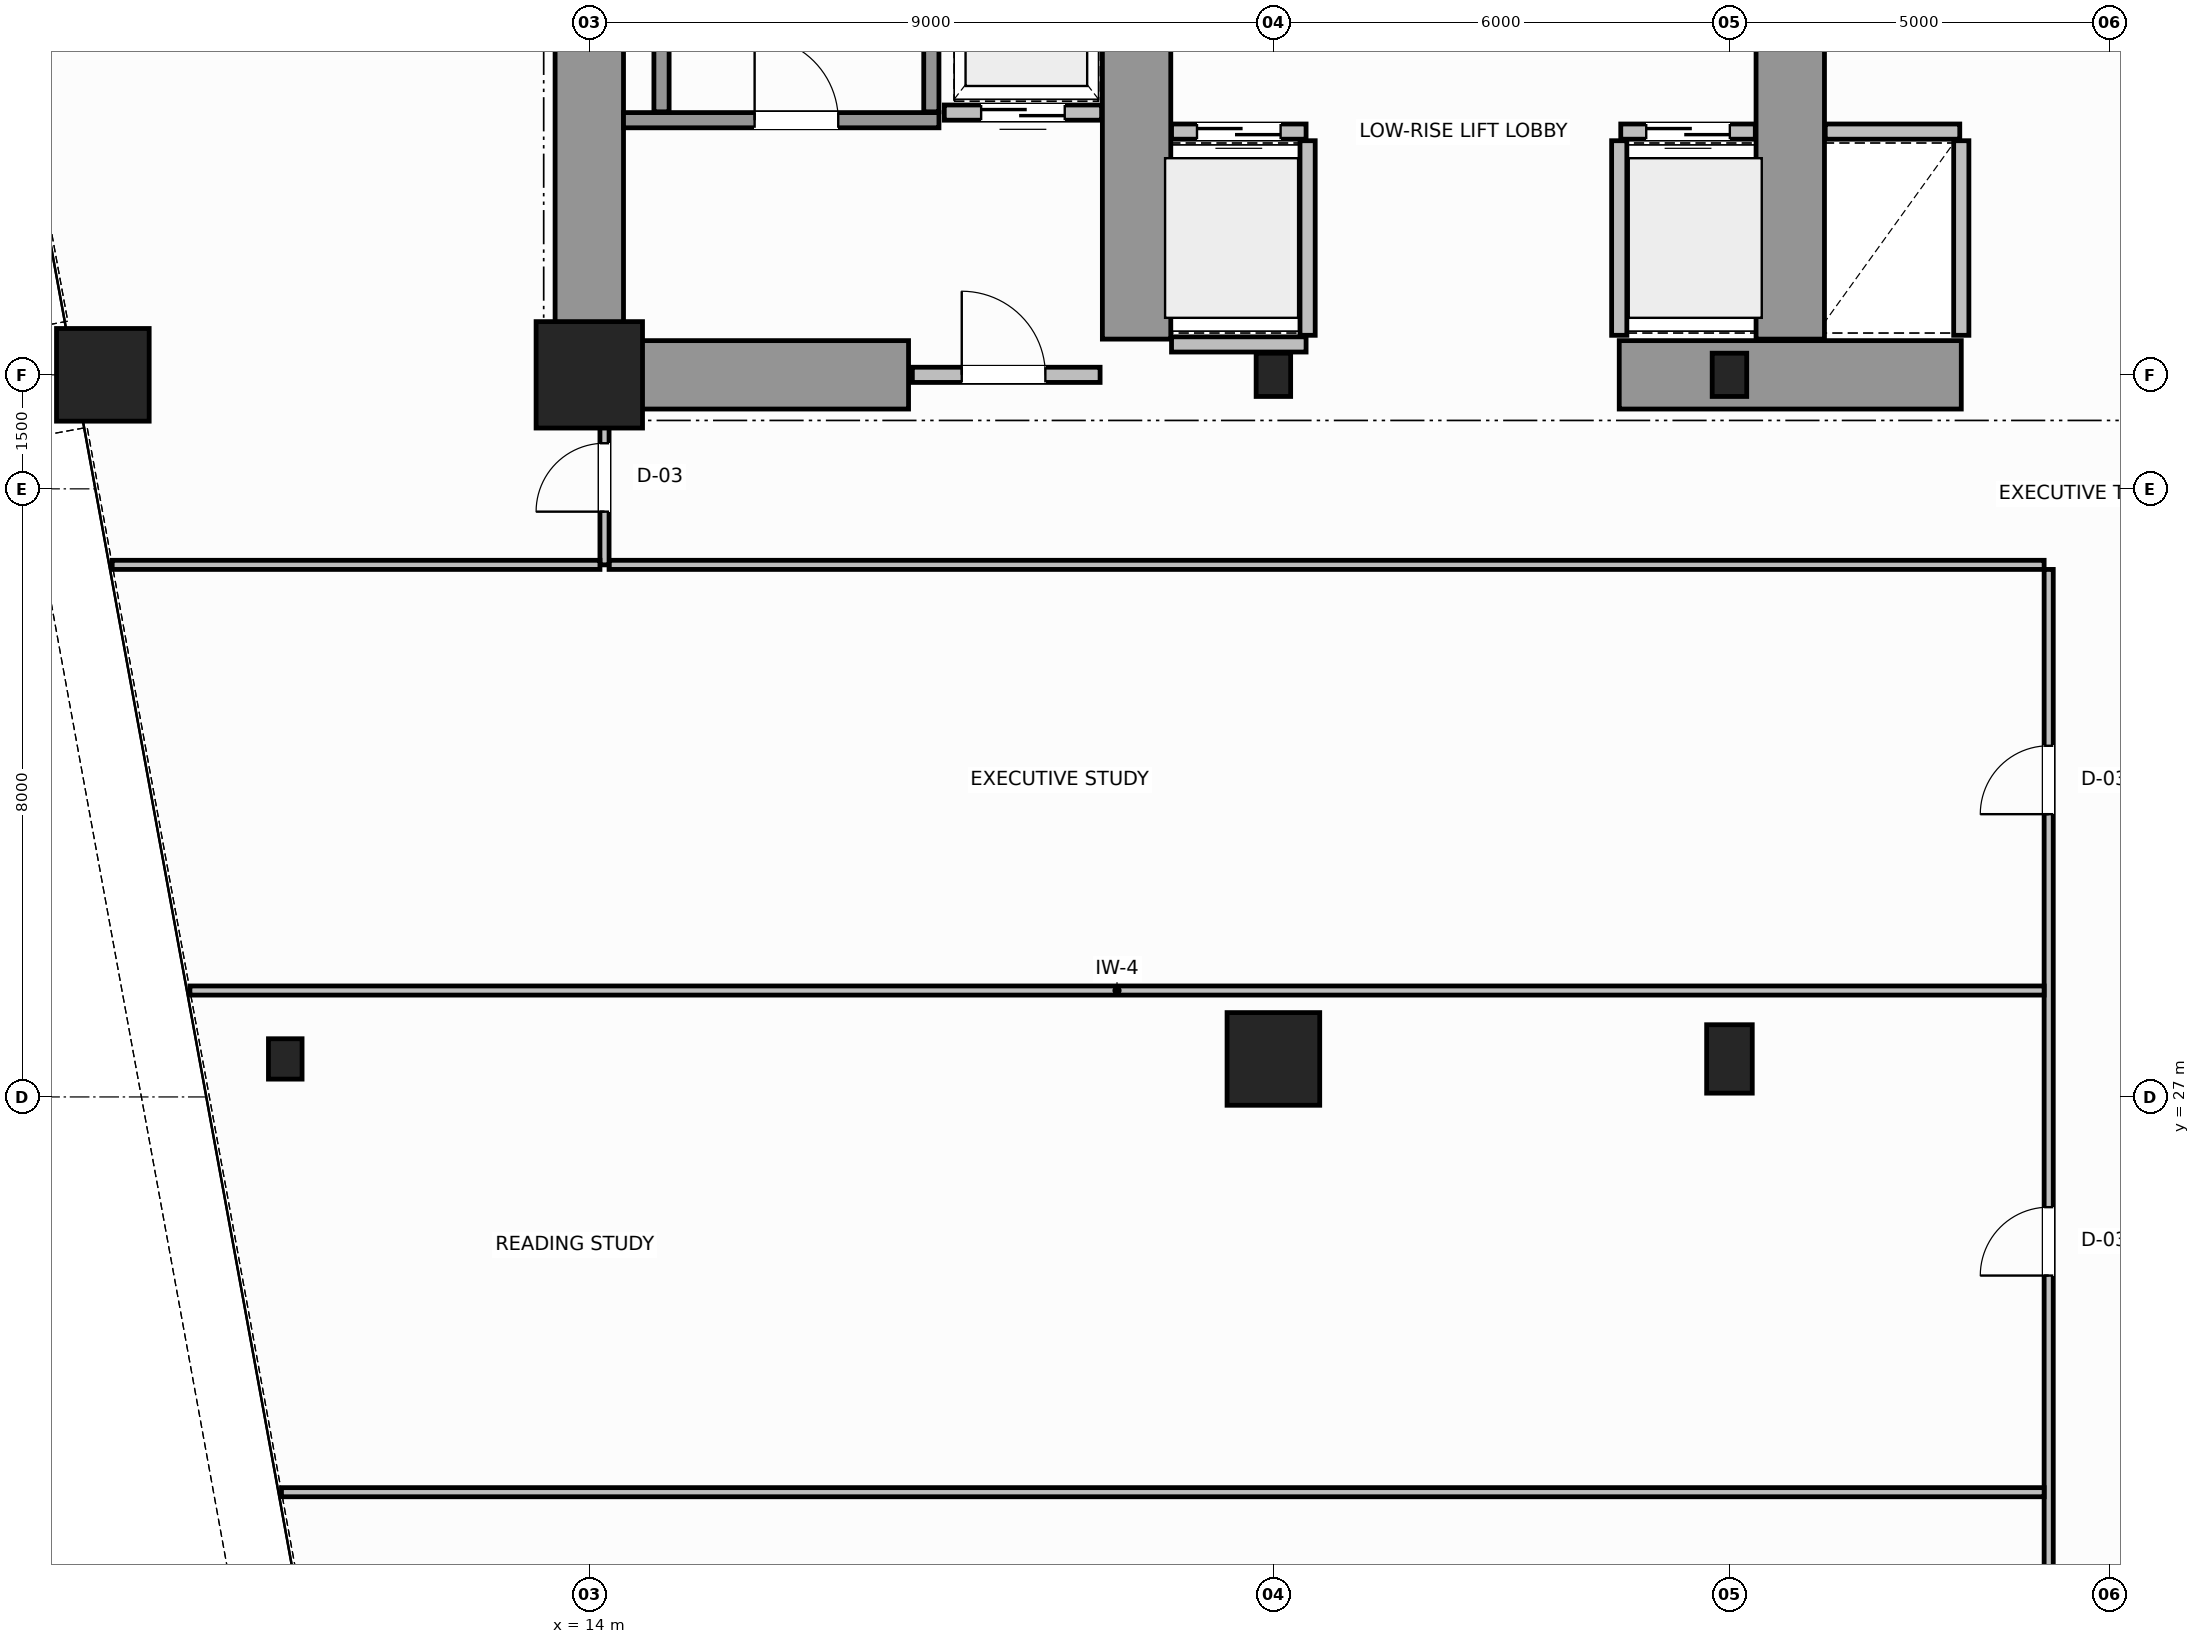
"""IFC4 building model, lengths in metres.
Left out: names, types, materials, properties, quantities, classifications, styles, units other than length and angle.
Written with IfcOpenShell. Run it as: python <this file> out.ifc"""

import sys

from ifc_helpers import new_model, si_unit, direction, frame, frame_2d, origin, origin_2d, place, context, subcontext, project, spatial, rectangle, hollow_rectangle, hollow_circle, i_section, extrude, source, transform, mapped, element, fill, save


model = new_model("IFC4")
c1 = context("Model", 3, precision=1e-05, world=origin(), true_north=direction((0.0, 1.0)))
c2 = subcontext(c1, "Body", "Model", "MODEL_VIEW")
j1 = project(units=[si_unit("LENGTHUNIT", "METRE"), si_unit("PLANEANGLEUNIT", "RADIAN")], contexts=[c1])
p1 = place(None, origin())
s1 = spatial("IfcSite", under=j1, at=p1, CompositionType="ELEMENT")
p2 = place(p1, origin())
s2 = spatial("IfcBuilding", under=s1, at=p2, CompositionType="ELEMENT")
p3 = place(p2, frame((0.0, 0.0, 68.2)))
s3 = spatial("IfcBuildingStorey", under=s2, at=p3, CompositionType="ELEMENT", Elevation=68.2)
m1 = source(origin(), c2, "Body", "SweptSolid", [
    extrude(rectangle(XDim=1.4, YDim=1.4, at=origin_2d()), origin(), (0.0, 0.0, 1.0), 3.8),
])
p4 = place(p3, frame((14.0, 36.5, 0.0), z_axis=(0.0, 0.0, 1.0), x_axis=(1.0, 0.0, 0.0)))
e1 = element("IfcColumn", 1, at=p4, inside=s3, PredefinedType="COLUMN", context=c2, shape_type="MappedRepresentation", body=[
    mapped(m1, transform((0.0, 0.0, 0.0), scale=1.0)),
])
m2 = source(origin(), c2, "Body", "SweptSolid", [
    extrude(i_section(OverallWidth=0.454, OverallDepth=0.569, WebThickness=0.078, FlangeThickness=0.08, FilletRadius=0.015, at=origin_2d()), origin(), (0.0, 0.0, 1.0), 3.8),
])
for number, where, z_axis, x_axis in (
    (2, (23.0, 36.5, 0.0), (0.0, 0.0, 1.0), (1.0, 0.0, 0.0)),
    (3, (29.0, 36.5, 0.0), (0.0, 0.0, 1.0), (1.0, 0.0, 0.0)),
):
    element("IfcColumn", number, at=place(p3, frame(where, z_axis=z_axis, x_axis=x_axis)), inside=s3, PredefinedType="COLUMN", context=c2, shape_type="MappedRepresentation", body=[
        mapped(m2, transform((0.0, 0.0, 0.0), scale=1.0)),
    ])
m3 = source(origin(), c2, "Body", "SweptSolid", [
    extrude(hollow_circle(Radius=0.61, WallThickness=0.05, at=origin_2d()), origin(), (0.0, 0.0, 1.0), 3.8),
])
p5 = place(p3, frame((7.6, 36.5, 0.0), z_axis=(0.0, 0.0, 1.0), x_axis=(1.0, 0.0, 0.0)))
e4 = element("IfcColumn", 4, at=p5, inside=s3, PredefinedType="COLUMN", context=c2, shape_type="MappedRepresentation", body=[
    mapped(m3, transform((0.0, 0.0, 0.0), scale=1.0)),
])
m4 = source(origin(), c2, "Body", "SweptSolid", [
    extrude(i_section(OverallWidth=0.442, OverallDepth=0.531, WebThickness=0.065, FlangeThickness=0.076, FilletRadius=0.015, at=origin_2d()), origin(), (0.0, 0.0, 1.0), 3.8),
])
p6 = place(p3, frame((10.0, 27.5, 0.0), z_axis=(0.0, 0.0, 1.0), x_axis=(1.0, 0.0, 0.0)))
e5 = element("IfcColumn", 5, at=p6, inside=s3, PredefinedType="COLUMN", context=c2, shape_type="MappedRepresentation", body=[
    mapped(m4, transform((0.0, 0.0, 0.0), scale=1.0)),
])
p7 = place(p3, frame((23.0, 27.5, 0.0), z_axis=(0.0, 0.0, 1.0), x_axis=(1.0, 0.0, 0.0)))
e6 = element("IfcColumn", 6, at=p7, inside=s3, PredefinedType="COLUMN", context=c2, shape_type="MappedRepresentation", body=[
    mapped(m3, transform((0.0, 0.0, 0.0), scale=1.0)),
])
m5 = source(origin(), c2, "Body", "SweptSolid", [
    extrude(hollow_rectangle(XDim=0.6, YDim=0.9, WallThickness=0.04, InnerFilletRadius=0.04, OuterFilletRadius=0.08, at=origin_2d()), origin(), (0.0, 0.0, 1.0), 3.8),
])
p8 = place(p3, frame((29.0, 27.5, 0.0), z_axis=(0.0, 0.0, 1.0), x_axis=(1.0, 0.0, 0.0)))
e7 = element("IfcColumn", 7, at=p8, inside=s3, PredefinedType="COLUMN", context=c2, shape_type="MappedRepresentation", body=[
    mapped(m5, transform((0.0, 0.0, 0.0), scale=1.0)),
])
p9 = place(p3, frame((14.0, 36.5, 0.0), z_axis=(0.0, 0.0, 1.0), x_axis=(0.0, 1.0, 0.0)))
e8 = element("IfcWall", 8, at=p9, inside=s3, PredefinedType="SHEAR", context=c2, shape_type="SweptSolid", body=[
    extrude(rectangle(XDim=14.5, YDim=0.9, at=frame_2d((7.25, 0.0))), origin(), (0.0, 0.0, 1.0), 3.8),
])
p10 = place(p3, frame((14.47, 36.5, 0.0), z_axis=(0.0, 0.0, 1.0), x_axis=(1.0, 0.0, 0.0)))
e9 = element("IfcWall", 9, at=p10, inside=s3, PredefinedType="SHEAR", context=c2, shape_type="SweptSolid", body=[
    extrude(rectangle(XDim=3.73, YDim=0.9, at=frame_2d((1.865, 0.0))), origin(), (0.0, 0.0, 1.0), 2.38),
])
p11 = place(p3, frame((27.55, 36.5, 0.0), z_axis=(0.0, 0.0, 1.0), x_axis=(1.0, 0.0, 0.0)))
e10 = element("IfcWall", 10, at=p11, inside=s3, PredefinedType="SHEAR", context=c2, shape_type="SweptSolid", body=[
    extrude(rectangle(XDim=4.5, YDim=0.9, at=frame_2d((2.25, 0.0))), origin(), (0.0, 0.0, 1.0), 3.8),
])
for number, where, z_axis, x_axis in (
    (11, (21.2, 36.97, 0.0), (0.0, 0.0, 1.0), (0.0, 1.0, 0.0)),
    (12, (29.8, 36.97, 0.0), (0.0, 0.0, 1.0), (0.0, 1.0, 0.0)),
):
    element("IfcWall", number, at=place(p3, frame(where, z_axis=z_axis, x_axis=x_axis)), inside=s3, PredefinedType="SHEAR", context=c2, shape_type="SweptSolid", body=[
        extrude(rectangle(XDim=9.23, YDim=0.9, at=frame_2d((4.615, 0.0))), origin(), (0.0, 0.0, 1.0), 3.8),
    ])
p12 = place(p3, frame((14.45, 39.85, 0.0), z_axis=(0.0, 0.0, 1.0), x_axis=(1.0, 0.0, 0.0)))
e13 = element("IfcWall", 13, at=p12, inside=s3, PredefinedType="SOLIDWALL", context=c2, shape_type="SweptSolid", body=[
    extrude(rectangle(XDim=4.15, YDim=0.2, at=frame_2d((2.075, 0.0))), origin(), (0.0, 0.0, 1.0), 3.8),
])
p13 = place(p12, frame((1.725, 0.0, 0.0)))
e14 = element("IfcOpeningElement", 14, at=p13, cuts=e13, PredefinedType="OPENING", context=c2, shape_type="SweptSolid", body=[
    extrude(rectangle(XDim=1.1, YDim=2.15, at=frame_2d((0.55, 1.075))), frame((0.0, 0.11, 0.0), z_axis=(0.0, -1.0, 0.0), x_axis=(1.0, 0.0, 0.0)), (0.0, 0.0, 1.0), 0.22),
])
for number, where, z_axis, x_axis in (
    (15, (14.95, 39.96, 0.0), (0.0, 0.0, 1.0), (0.0, 1.0, 0.0)),
    (16, (18.5, 39.96, 0.0), (0.0, 0.0, 1.0), (0.0, 1.0, 0.0)),
):
    element("IfcWall", number, at=place(p3, frame(where, z_axis=z_axis, x_axis=x_axis)), inside=s3, PredefinedType="SOLIDWALL", context=c2, shape_type="SweptSolid", body=[
        extrude(rectangle(XDim=9.93, YDim=0.2, at=frame_2d((4.965, 0.0))), origin(), (0.0, 0.0, 1.0), 3.8),
    ])
p14 = place(p3, frame((18.25, 36.5, 0.0), z_axis=(0.0, 0.0, 1.0), x_axis=(1.0, 0.0, 0.0)))
e17 = element("IfcWall", 17, at=p14, inside=s3, PredefinedType="SOLIDWALL", context=c2, shape_type="SweptSolid", body=[
    extrude(rectangle(XDim=2.47, YDim=0.2, at=frame_2d((1.235, 0.0))), origin(), (0.0, 0.0, 1.0), 2.37),
])
p15 = place(p14, frame((0.65, 0.0, 0.0)))
e18 = element("IfcOpeningElement", 18, at=p15, cuts=e17, PredefinedType="OPENING", context=c2, shape_type="SweptSolid", body=[
    extrude(rectangle(XDim=1.1, YDim=2.15, at=frame_2d((0.55, 1.075))), frame((0.0, 0.11, 0.0), z_axis=(0.0, -1.0, 0.0), x_axis=(1.0, 0.0, 0.0)), (0.0, 0.0, 1.0), 0.22),
])
p16 = place(p3, frame((21.66, 39.7, 0.0), z_axis=(0.0, 0.0, 1.0), x_axis=(1.0, 0.0, 0.0)))
e19 = element("IfcWall", 19, at=p16, inside=s3, PredefinedType="SOLIDWALL", context=c2, shape_type="SweptSolid", body=[
    extrude(rectangle(XDim=1.77, YDim=0.2, at=frame_2d((0.885, 0.0))), origin(), (0.0, 0.0, 1.0), 3.58),
])
p17 = place(p16, frame((0.335, 0.0, 0.0)))
e20 = element("IfcOpeningElement", 20, at=p17, cuts=e19, PredefinedType="OPENING", context=c2, shape_type="SweptSolid", body=[
    extrude(rectangle(XDim=1.1, YDim=2.15, at=frame_2d((0.55, 1.075))), frame((0.0, 0.11, 0.0), z_axis=(0.0, -1.0, 0.0), x_axis=(1.0, 0.0, 0.0)), (0.0, 0.0, 1.0), 0.22),
])
p18 = place(p3, frame((21.66, 36.9, 0.0), z_axis=(0.0, 0.0, 1.0), x_axis=(1.0, 0.0, 0.0)))
e21 = element("IfcWall", 21, at=p18, inside=s3, PredefinedType="SOLIDWALL", context=c2, shape_type="SweptSolid", body=[
    extrude(rectangle(XDim=1.77, YDim=0.2, at=frame_2d((0.885, 0.0))), origin(), (0.0, 0.0, 1.0), 2.37),
])
p19 = place(p3, frame((23.45, 37.02, 0.0), z_axis=(0.0, 0.0, 1.0), x_axis=(0.0, 1.0, 0.0)))
e22 = element("IfcWall", 22, at=p19, inside=s3, PredefinedType="SOLIDWALL", context=c2, shape_type="SweptSolid", body=[
    extrude(rectangle(XDim=2.56, YDim=0.2, at=frame_2d((1.28, 0.0))), origin(), (0.0, 0.0, 1.0), 3.58),
])
p20 = place(p3, frame((27.57, 39.7, 0.0), z_axis=(0.0, 0.0, 1.0), x_axis=(1.0, 0.0, 0.0)))
e23 = element("IfcWall", 23, at=p20, inside=s3, PredefinedType="SOLIDWALL", context=c2, shape_type="SweptSolid", body=[
    extrude(rectangle(XDim=1.77, YDim=0.2, at=frame_2d((0.885, 0.0))), origin(), (0.0, 0.0, 1.0), 3.58),
])
p21 = place(p20, frame((0.335, 0.0, 0.0)))
e24 = element("IfcOpeningElement", 24, at=p21, cuts=e23, PredefinedType="OPENING", context=c2, shape_type="SweptSolid", body=[
    extrude(rectangle(XDim=1.1, YDim=2.15, at=frame_2d((0.55, 1.075))), frame((0.0, 0.11, 0.0), z_axis=(0.0, -1.0, 0.0), x_axis=(1.0, 0.0, 0.0)), (0.0, 0.0, 1.0), 0.22),
])
p22 = place(p3, frame((27.55, 37.02, 0.0), z_axis=(0.0, 0.0, 1.0), x_axis=(0.0, 1.0, 0.0)))
e25 = element("IfcWall", 25, at=p22, inside=s3, PredefinedType="SOLIDWALL", context=c2, shape_type="SweptSolid", body=[
    extrude(rectangle(XDim=2.56, YDim=0.2, at=frame_2d((1.28, 0.0))), origin(), (0.0, 0.0, 1.0), 3.58),
])
p23 = place(p3, frame((30.26, 39.7, 0.0), z_axis=(0.0, 0.0, 1.0), x_axis=(1.0, 0.0, 0.0)))
e26 = element("IfcWall", 26, at=p23, inside=s3, PredefinedType="SOLIDWALL", context=c2, shape_type="SweptSolid", body=[
    extrude(rectangle(XDim=1.77, YDim=0.2, at=frame_2d((0.885, 0.0))), origin(), (0.0, 0.0, 1.0), 3.58),
])
p24 = place(p3, frame((32.05, 37.02, 0.0), z_axis=(0.0, 0.0, 1.0), x_axis=(0.0, 1.0, 0.0)))
e27 = element("IfcWall", 27, at=p24, inside=s3, PredefinedType="SOLIDWALL", context=c2, shape_type="SweptSolid", body=[
    extrude(rectangle(XDim=2.56, YDim=0.2, at=frame_2d((1.28, 0.0))), origin(), (0.0, 0.0, 1.0), 3.58),
])
p25 = place(p3, frame((18.67, 39.95, 0.0), z_axis=(0.0, 0.0, 1.0), x_axis=(1.0, 0.0, 0.0)))
e28 = element("IfcWall", 28, at=p25, inside=s3, PredefinedType="SOLIDWALL", context=c2, shape_type="SweptSolid", body=[
    extrude(rectangle(XDim=2.07, YDim=0.2, at=frame_2d((1.035, 0.0))), origin(), (0.0, 0.0, 1.0), 3.58),
])
p26 = place(p25, frame((0.485, 0.0, 0.0)))
e29 = element("IfcOpeningElement", 29, at=p26, cuts=e28, PredefinedType="OPENING", context=c2, shape_type="SweptSolid", body=[
    extrude(rectangle(XDim=1.1, YDim=2.15, at=frame_2d((0.55, 1.075))), frame((0.0, 0.11, 0.0), z_axis=(0.0, -1.0, 0.0), x_axis=(1.0, 0.0, 0.0)), (0.0, 0.0, 1.0), 0.22),
])
p27 = place(p3, frame((14.26, 34.0, 0.0), z_axis=(0.0, 0.0, 1.0), x_axis=(1.0, 0.0, 0.0)))
e30 = element("IfcWall", 30, at=p27, inside=s3, PredefinedType="PARTITIONING", context=c2, shape_type="SweptSolid", body=[
    extrude(rectangle(XDim=18.88, YDim=0.12, at=frame_2d((9.44, 0.0))), origin(), (0.0, 0.0, 1.0), 3.58),
])
p28 = place(p3, frame((14.2, 34.0, 0.0), z_axis=(0.0, 0.0, 1.0), x_axis=(0.0, 1.0, 0.0)))
e31 = element("IfcWall", 31, at=p28, inside=s3, PredefinedType="PARTITIONING", context=c2, shape_type="SweptSolid", body=[
    extrude(rectangle(XDim=2.44, YDim=0.12, at=frame_2d((1.22, 0.0))), origin(), (0.0, 0.0, 1.0), 3.58),
])
p29 = place(p28, frame((0.7, 0.0, 0.0)))
e32 = element("IfcOpeningElement", 32, at=p29, cuts=e31, PredefinedType="OPENING", context=c2, shape_type="SweptSolid", body=[
    extrude(rectangle(XDim=0.9, YDim=2.15, at=frame_2d((0.45, 1.075))), frame((0.0, 0.07, 0.0), z_axis=(0.0, -1.0, 0.0), x_axis=(1.0, 0.0, 0.0)), (0.0, 0.0, 1.0), 0.14),
])
p30 = place(p3, frame((33.2, 14.4, 0.0), z_axis=(0.0, 0.0, 1.0), x_axis=(0.0, 1.0, 0.0)))
e33 = element("IfcWall", 33, at=p30, inside=s3, PredefinedType="PARTITIONING", context=c2, shape_type="SweptSolid", body=[
    extrude(rectangle(XDim=19.54, YDim=0.12, at=frame_2d((9.77, 0.0))), origin(), (0.0, 0.0, 1.0), 3.58),
])
p31 = place(p30, frame((3.25, 0.0, 0.0)))
e34 = element("IfcOpeningElement", 34, at=p31, cuts=e33, PredefinedType="OPENING", context=c2, shape_type="SweptSolid", body=[
    extrude(rectangle(XDim=0.9, YDim=2.15, at=frame_2d((0.45, 1.075))), frame((0.0, 0.07, 0.0), z_axis=(0.0, -1.0, 0.0), x_axis=(1.0, 0.0, 0.0)), (0.0, 0.0, 1.0), 0.14),
])
p32 = place(p30, frame((10.25, 0.0, 0.0)))
e35 = element("IfcOpeningElement", 35, at=p32, cuts=e33, PredefinedType="OPENING", context=c2, shape_type="SweptSolid", body=[
    extrude(rectangle(XDim=0.9, YDim=2.15, at=frame_2d((0.45, 1.075))), frame((0.0, 0.07, 0.0), z_axis=(0.0, -1.0, 0.0), x_axis=(1.0, 0.0, 0.0)), (0.0, 0.0, 1.0), 0.14),
])
p33 = place(p30, frame((16.32, 0.0, 0.0)))
e36 = element("IfcOpeningElement", 36, at=p33, cuts=e33, PredefinedType="OPENING", context=c2, shape_type="SweptSolid", body=[
    extrude(rectangle(XDim=0.9, YDim=2.15, at=frame_2d((0.45, 1.075))), frame((0.0, 0.07, 0.0), z_axis=(0.0, -1.0, 0.0), x_axis=(1.0, 0.0, 0.0)), (0.0, 0.0, 1.0), 0.14),
])
p34 = place(p3, frame((7.723, 34.0, 0.0), z_axis=(0.0, 0.0, 1.0), x_axis=(1.0, 0.0, 0.0)))
e37 = element("IfcWall", 37, at=p34, inside=s3, PredefinedType="PARTITIONING", context=c2, shape_type="SweptSolid", body=[
    extrude(rectangle(XDim=6.417, YDim=0.12, at=frame_2d((3.208, 0.0))), origin(), (0.0, 0.0, 1.0), 3.58),
])
p35 = place(p3, frame((9.95, 21.8, 0.0), z_axis=(0.0, 0.0, 1.0), x_axis=(1.0, 0.0, 0.0)))
e38 = element("IfcWall", 38, at=p35, inside=s3, PredefinedType="PARTITIONING", context=c2, shape_type="SweptSolid", body=[
    extrude(rectangle(XDim=23.19, YDim=0.12, at=frame_2d((11.595, 0.0))), origin(), (0.0, 0.0, 1.0), 3.58),
])
p36 = place(p3, frame((8.745, 28.4, 0.0), z_axis=(0.0, 0.0, 1.0), x_axis=(1.0, 0.0, 0.0)))
e39 = element("IfcWall", 39, at=p36, inside=s3, PredefinedType="PARTITIONING", context=c2, shape_type="SweptSolid", body=[
    extrude(rectangle(XDim=24.395, YDim=0.12, at=frame_2d((12.197, 0.0))), origin(), (0.0, 0.0, 1.0), 3.58),
])
m6 = source(origin(), c2, "Body", "SweptSolid", [
    extrude(rectangle(XDim=1.1, YDim=2.15, at=frame_2d((0.55, 1.075))), frame((0.0, 0.025, 0.0), z_axis=(0.0, -1.0, 0.0), x_axis=(1.0, 0.0, 0.0)), (0.0, 0.0, 1.0), 0.05),
])
p37 = place(p13, origin())
e40 = element("IfcDoor", 40, at=p37, inside=s3, OperationType="SINGLE_SWING_LEFT", PredefinedType="DOOR", context=c2, shape_type="MappedRepresentation", body=[
    mapped(m6, transform((0.0, 0.0, 0.0), scale=1.0)),
])
fill(e14, e40)
p38 = place(p15, origin())
e41 = element("IfcDoor", 41, at=p38, inside=s3, OperationType="SINGLE_SWING_RIGHT", PredefinedType="DOOR", context=c2, shape_type="MappedRepresentation", body=[
    mapped(m6, transform((0.0, 0.0, 0.0), scale=1.0)),
])
fill(e18, e41)
p39 = place(p17, origin())
e42 = element("IfcDoor", 42, at=p39, inside=s3, OperationType="DOUBLE_DOOR_SLIDING", PredefinedType="DOOR", context=c2, shape_type="MappedRepresentation", body=[
    mapped(m6, transform((0.0, 0.0, 0.0), scale=1.0)),
])
fill(e20, e42)
p40 = place(p21, origin())
e43 = element("IfcDoor", 43, at=p40, inside=s3, OperationType="DOUBLE_DOOR_SLIDING", PredefinedType="DOOR", context=c2, shape_type="MappedRepresentation", body=[
    mapped(m6, transform((0.0, 0.0, 0.0), scale=1.0)),
])
fill(e24, e43)
p41 = place(p26, origin())
e44 = element("IfcDoor", 44, at=p41, inside=s3, OperationType="DOUBLE_DOOR_SLIDING", PredefinedType="DOOR", context=c2, shape_type="MappedRepresentation", body=[
    mapped(m6, transform((0.0, 0.0, 0.0), scale=1.0)),
])
fill(e29, e44)
m7 = source(origin(), c2, "Body", "SweptSolid", [
    extrude(rectangle(XDim=0.9, YDim=2.15, at=frame_2d((0.45, 1.075))), frame((0.0, 0.025, 0.0), z_axis=(0.0, -1.0, 0.0), x_axis=(1.0, 0.0, 0.0)), (0.0, 0.0, 1.0), 0.05),
])
p42 = place(p29, origin())
e45 = element("IfcDoor", 45, at=p42, inside=s3, OperationType="SINGLE_SWING_LEFT", PredefinedType="DOOR", context=c2, shape_type="MappedRepresentation", body=[
    mapped(m7, transform((0.0, 0.0, 0.0), scale=1.0)),
])
fill(e32, e45)
p43 = place(p32, origin())
e46 = element("IfcDoor", 46, at=p43, inside=s3, OperationType="SINGLE_SWING_RIGHT", PredefinedType="DOOR", context=c2, shape_type="MappedRepresentation", body=[
    mapped(m7, transform((0.0, 0.0, 0.0), scale=1.0)),
])
fill(e35, e46)
p44 = place(p33, origin())
e47 = element("IfcDoor", 47, at=p44, inside=s3, OperationType="SINGLE_SWING_LEFT", PredefinedType="DOOR", context=c2, shape_type="MappedRepresentation", body=[
    mapped(m7, transform((0.0, 0.0, 0.0), scale=1.0)),
])
fill(e36, e47)
save(model, sys.argv[1])
